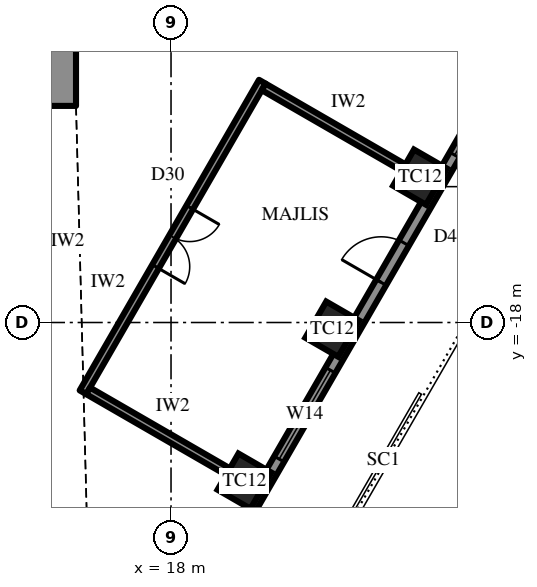
"""IFC4 building model, lengths in metres.
Left out: names, types, materials, properties, quantities, classifications, styles, units other than length and angle.
Written with IfcOpenShell. Run it as: python <this file> out.ifc"""

import sys

from ifc_helpers import new_model, si_unit, direction, frame, frame_2d, origin, origin_2d, place, context, subcontext, project, spatial, rectangle, extrude, element, fill, save


model = new_model("IFC4")
c1 = context("Model", 3, precision=1e-05, world=origin(), true_north=direction((0.0, 1.0)))
c2 = subcontext(c1, "Body", "Model", "MODEL_VIEW")
j1 = project(units=[si_unit("LENGTHUNIT", "METRE"), si_unit("PLANEANGLEUNIT", "RADIAN")], contexts=[c1])
p1 = place(None, origin())
s1 = spatial("IfcSite", under=j1, at=p1, CompositionType="ELEMENT")
p2 = place(p1, origin())
s2 = spatial("IfcBuilding", under=s1, at=p2, CompositionType="ELEMENT")
p3 = place(p2, frame((0.0, 0.0, 282.7)))
s3 = spatial("IfcBuildingStorey", under=s2, at=p3, CompositionType="ELEMENT", Elevation=282.7)
for number, where, z_axis, x_axis in (
    (1, (19.933, -22.175, 0.0), (0.0, 0.0, 1.0), (0.5, 0.866, 0.0)),
    (2, (22.242, -18.175, 0.0), (0.0, 0.0, 1.0), (0.5, 0.866, 0.0)),
    (3, (24.552, -14.175, 0.0), (0.0, 0.0, 1.0), (0.5, 0.866, 0.0)),
):
    element("IfcColumn", number, at=place(p3, frame(where, z_axis=z_axis, x_axis=x_axis)), inside=s3, PredefinedType="COLUMN", context=c2, shape_type="SweptSolid", body=[
        extrude(rectangle(XDim=1.1, YDim=1.0, at=origin_2d()), origin(), (0.0, 0.0, 1.0), 4.2),
    ])
p4 = place(p3, frame((15.5, -11.5, 0.0), z_axis=(0.0, 0.0, 1.0), x_axis=(-1.0, 0.0, 0.0)))
e4 = element("IfcWall", 4, at=p4, inside=s3, PredefinedType="SHEAR", context=c2, shape_type="SweptSolid", body=[
    extrude(rectangle(XDim=31.0, YDim=1.6, at=frame_2d((15.5, 0.0))), origin(), (0.0, 0.0, 1.0), 4.2),
])
p5 = place(p4, frame((16.35, 0.0, 0.0)))
e5 = element("IfcOpeningElement", 5, at=p5, cuts=e4, PredefinedType="OPENING", context=c2, shape_type="SweptSolid", body=[
    extrude(rectangle(XDim=0.9, YDim=2.2, at=frame_2d((0.45, 1.1))), frame((0.0, 0.81, 0.0), z_axis=(0.0, -1.0, 0.0), x_axis=(1.0, 0.0, 0.0)), (0.0, 0.0, 1.0), 1.62),
])
p6 = place(p4, frame((19.35, 0.0, 0.0)))
e6 = element("IfcOpeningElement", 6, at=p6, cuts=e4, PredefinedType="OPENING", context=c2, shape_type="SweptSolid", body=[
    extrude(rectangle(XDim=0.9, YDim=2.2, at=frame_2d((0.45, 1.1))), frame((0.0, 0.81, 0.0), z_axis=(0.0, -1.0, 0.0), x_axis=(1.0, 0.0, 0.0)), (0.0, 0.0, 1.0), 1.62),
])
p7 = place(p4, frame((22.4, 0.0, 0.0)))
e7 = element("IfcOpeningElement", 7, at=p7, cuts=e4, PredefinedType="OPENING", context=c2, shape_type="SweptSolid", body=[
    extrude(rectangle(XDim=1.0, YDim=2.2, at=frame_2d((0.5, 1.1))), frame((0.0, 0.81, 0.0), z_axis=(0.0, -1.0, 0.0), x_axis=(1.0, 0.0, 0.0)), (0.0, 0.0, 1.0), 1.62),
])
p8 = place(p4, frame((1.65, 0.0, 0.0)))
e8 = element("IfcOpeningElement", 8, at=p8, cuts=e4, PredefinedType="OPENING", context=c2, shape_type="SweptSolid", body=[
    extrude(rectangle(XDim=0.9, YDim=2.2, at=frame_2d((0.45, 1.1))), frame((0.0, 0.81, 0.0), z_axis=(0.0, -1.0, 0.0), x_axis=(1.0, 0.0, 0.0)), (0.0, 0.0, 1.0), 1.62),
])
p9 = place(p4, frame((4.65, 0.0, 0.0)))
e9 = element("IfcOpeningElement", 9, at=p9, cuts=e4, PredefinedType="OPENING", context=c2, shape_type="SweptSolid", body=[
    extrude(rectangle(XDim=0.9, YDim=2.2, at=frame_2d((0.45, 1.1))), frame((0.0, 0.81, 0.0), z_axis=(0.0, -1.0, 0.0), x_axis=(1.0, 0.0, 0.0)), (0.0, 0.0, 1.0), 1.62),
])
p10 = place(p4, frame((25.45, 0.0, 0.0)))
e10 = element("IfcOpeningElement", 10, at=p10, cuts=e4, PredefinedType="OPENING", context=c2, shape_type="SweptSolid", body=[
    extrude(rectangle(XDim=0.9, YDim=2.2, at=frame_2d((0.45, 1.1))), frame((0.0, 0.81, 0.0), z_axis=(0.0, -1.0, 0.0), x_axis=(1.0, 0.0, 0.0)), (0.0, 0.0, 1.0), 1.62),
])
p11 = place(p4, frame((28.45, 0.0, 0.0)))
e11 = element("IfcOpeningElement", 11, at=p11, cuts=e4, PredefinedType="OPENING", context=c2, shape_type="SweptSolid", body=[
    extrude(rectangle(XDim=0.9, YDim=2.2, at=frame_2d((0.45, 1.1))), frame((0.0, 0.81, 0.0), z_axis=(0.0, -1.0, 0.0), x_axis=(1.0, 0.0, 0.0)), (0.0, 0.0, 1.0), 1.62),
])
p12 = place(p3, frame((18.707, -25.299, 0.0), z_axis=(0.0, 0.0, 1.0), x_axis=(0.500000442367, 0.866025148383, 0.0)))
e12 = element("IfcWall", 12, at=p12, inside=s3, PredefinedType="SOLIDWALL", context=c2, shape_type="SweptSolid", body=[
    extrude(rectangle(XDim=25.113, YDim=0.3, at=frame_2d((12.556, 0.0))), origin(), (0.0, 0.0, 1.0), 2.8),
])
p13 = place(p12, frame((4.278, 0.0, 0.6)))
e13 = element("IfcOpeningElement", 13, at=p13, cuts=e12, PredefinedType="OPENING", context=c2, shape_type="SweptSolid", body=[
    extrude(rectangle(XDim=2.7, YDim=1.95, at=frame_2d((1.35, 0.975))), frame((0.0, 0.16, 0.0), z_axis=(0.0, -1.0, 0.0), x_axis=(1.0, 0.0, 0.0)), (0.0, 0.0, 1.0), 0.32),
])
p14 = place(p12, frame((9.647, 0.0, 0.0)))
e14 = element("IfcOpeningElement", 14, at=p14, cuts=e12, PredefinedType="OPENING", context=c2, shape_type="SweptSolid", body=[
    extrude(rectangle(XDim=1.2, YDim=2.4, at=frame_2d((0.6, 1.2))), frame((0.0, 0.16, 0.0), z_axis=(0.0, -1.0, 0.0), x_axis=(1.0, 0.0, 0.0)), (0.0, 0.0, 1.0), 0.32),
])
p15 = place(p12, frame((13.516, 0.0, 0.6)))
e15 = element("IfcOpeningElement", 15, at=p15, cuts=e12, PredefinedType="OPENING", context=c2, shape_type="SweptSolid", body=[
    extrude(rectangle(XDim=2.7, YDim=1.95, at=frame_2d((1.35, 0.975))), frame((0.0, 0.16, 0.0), z_axis=(0.0, -1.0, 0.0), x_axis=(1.0, 0.0, 0.0)), (0.0, 0.0, 1.0), 0.32),
])
p16 = place(p12, frame((18.135, 0.0, 0.6)))
e16 = element("IfcOpeningElement", 16, at=p16, cuts=e12, PredefinedType="OPENING", context=c2, shape_type="SweptSolid", body=[
    extrude(rectangle(XDim=2.7, YDim=1.95, at=frame_2d((1.35, 0.975))), frame((0.0, 0.16, 0.0), z_axis=(0.0, -1.0, 0.0), x_axis=(1.0, 0.0, 0.0)), (0.0, 0.0, 1.0), 0.32),
])
p17 = place(p3, frame((15.683, -19.837, 0.0), z_axis=(0.0, 0.0, 1.0), x_axis=(0.499989672313, 0.866031366395, 0.0)))
e17 = element("IfcWall", 17, at=p17, inside=s3, PredefinedType="PARTITIONING", context=c2, shape_type="SweptSolid", body=[
    extrude(rectangle(XDim=9.438, YDim=0.2, at=frame_2d((4.719, 0.0))), origin(), (0.0, 0.0, 1.0), 4.0),
])
p18 = place(p17, frame((3.819, 0.0, 0.0)))
e18 = element("IfcOpeningElement", 18, at=p18, cuts=e17, PredefinedType="OPENING", context=c2, shape_type="SweptSolid", body=[
    extrude(rectangle(XDim=1.8, YDim=2.4, at=frame_2d((0.9, 1.2))), frame((0.0, 0.11, 0.0), z_axis=(0.0, -1.0, 0.0), x_axis=(1.0, 0.0, 0.0)), (0.0, 0.0, 1.0), 0.22),
])
for number, where, z_axis, x_axis in (
    (19, (15.819, -19.8, 0.0), (0.0, 0.0, 1.0), (0.866, -0.5, 0.0)),
    (20, (20.438, -11.8, 0.0), (0.0, 0.0, 1.0), (0.866, -0.5, 0.0)),
):
    element("IfcWall", number, at=place(p3, frame(where, z_axis=z_axis, x_axis=x_axis)), inside=s3, PredefinedType="PARTITIONING", context=c2, shape_type="SweptSolid", body=[
        extrude(rectangle(XDim=4.25, YDim=0.2, at=frame_2d((2.125, 0.0))), origin(), (0.0, 0.0, 1.0), 3.082),
    ])
p19 = place(p13, origin())
e21 = element("IfcWindow", 21, at=p19, inside=s3, PartitioningType="SINGLE_PANEL", PredefinedType="WINDOW", context=c2, shape_type="SweptSolid", body=[
    extrude(rectangle(XDim=2.7, YDim=1.95, at=frame_2d((1.35, 0.975))), frame((0.0, 0.03, 0.0), z_axis=(0.0, -1.0, 0.0), x_axis=(1.0, 0.0, 0.0)), (0.0, 0.0, 1.0), 0.06),
])
fill(e13, e21)
p20 = place(p14, origin())
e22 = element("IfcDoor", 22, at=p20, inside=s3, OperationType="SINGLE_SWING_RIGHT", PredefinedType="DOOR", context=c2, shape_type="SweptSolid", body=[
    extrude(rectangle(XDim=1.2, YDim=2.4, at=frame_2d((0.6, 1.2))), frame((0.0, 0.025, 0.0), z_axis=(0.0, -1.0, 0.0), x_axis=(1.0, 0.0, 0.0)), (0.0, 0.0, 1.0), 0.05),
])
fill(e14, e22)
p21 = place(p15, origin())
e23 = element("IfcWindow", 23, at=p21, inside=s3, PartitioningType="SINGLE_PANEL", PredefinedType="WINDOW", context=c2, shape_type="SweptSolid", body=[
    extrude(rectangle(XDim=2.7, YDim=1.95, at=frame_2d((1.35, 0.975))), frame((0.0, 0.03, 0.0), z_axis=(0.0, -1.0, 0.0), x_axis=(1.0, 0.0, 0.0)), (0.0, 0.0, 1.0), 0.06),
])
fill(e15, e23)
p22 = place(p18, frame((1.8, 0.0, 0.0), z_axis=(0.0, 0.0, 1.0), x_axis=(-1.0, 0.0, 0.0)))
e24 = element("IfcDoor", 24, at=p22, inside=s3, OperationType="DOUBLE_DOOR_SINGLE_SWING", PredefinedType="DOOR", context=c2, shape_type="SweptSolid", body=[
    extrude(rectangle(XDim=1.8, YDim=2.4, at=frame_2d((0.9, 1.2))), frame((0.0, 0.025, 0.0), z_axis=(0.0, -1.0, 0.0), x_axis=(1.0, 0.0, 0.0)), (0.0, 0.0, 1.0), 0.05),
])
fill(e18, e24)
save(model, sys.argv[1])
